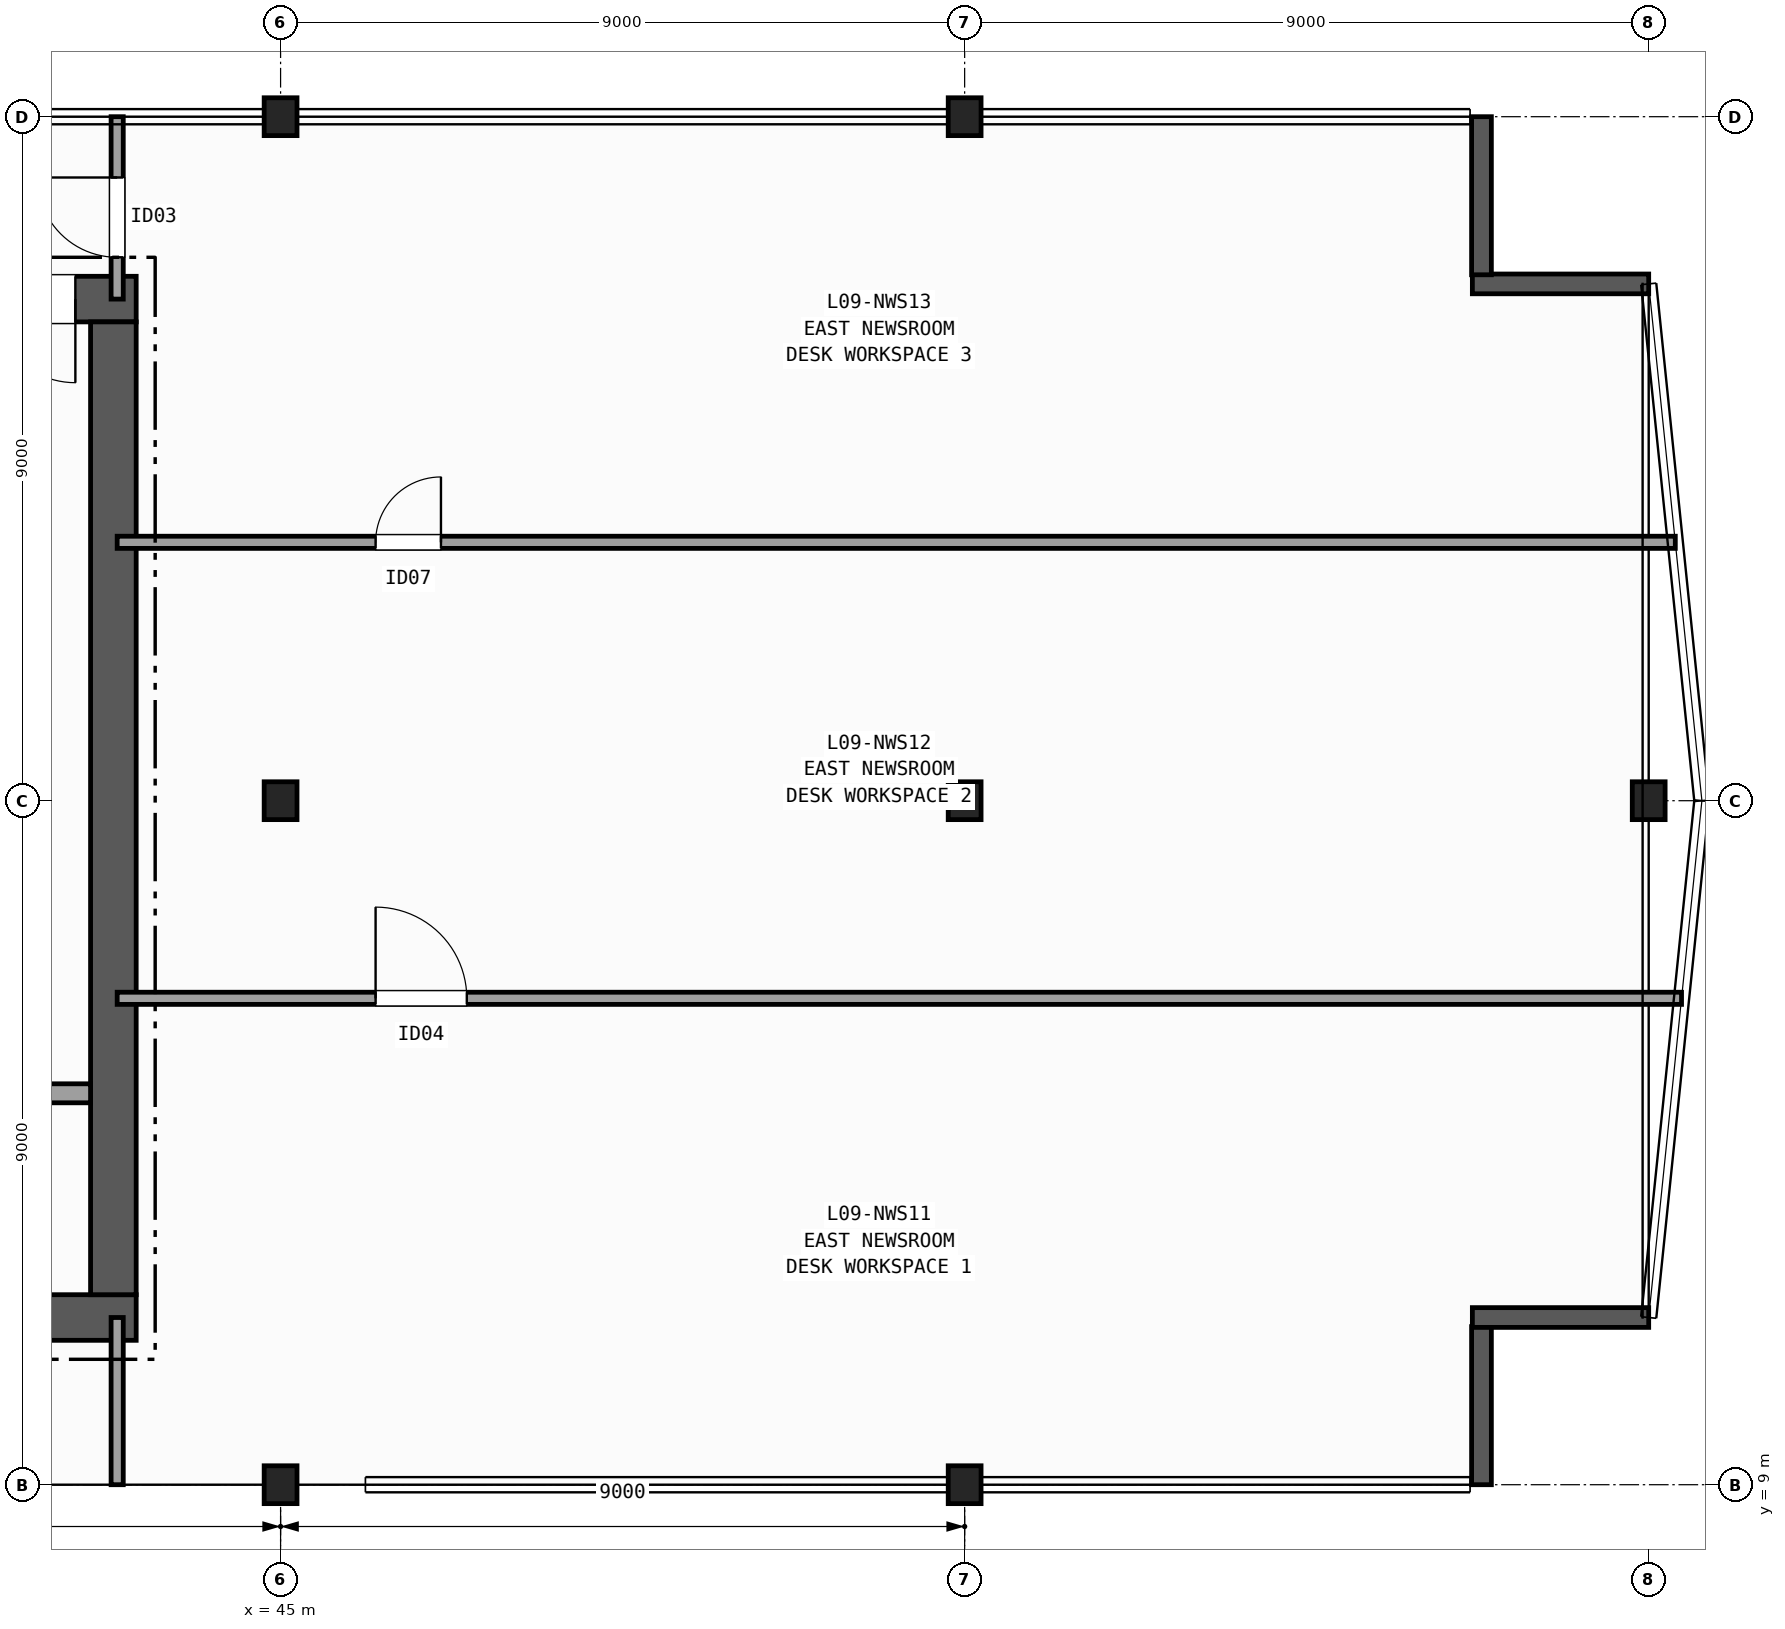
"""IFC4 building model, lengths in metres.
Left out: names, types, materials, properties, quantities, classifications, styles, units other than length and angle.
Written with IfcOpenShell. Run it as: python <this file> out.ifc"""

import sys

from ifc_helpers import new_model, si_unit, direction, frame, frame_2d, origin, origin_2d, place, context, subcontext, project, spatial, rectangle, i_section, extrude, element, fill, save


model = new_model("IFC4")
c1 = context("Model", 3, precision=1e-05, world=origin(), true_north=direction((0.0, 1.0)))
c2 = subcontext(c1, "Body", "Model", "MODEL_VIEW")
j1 = project(units=[si_unit("LENGTHUNIT", "METRE"), si_unit("PLANEANGLEUNIT", "RADIAN")], contexts=[c1])
p1 = place(None, origin())
s1 = spatial("IfcSite", under=j1, at=p1, CompositionType="ELEMENT")
p2 = place(p1, origin())
s2 = spatial("IfcBuilding", under=s1, at=p2, CompositionType="ELEMENT")
p3 = place(p2, frame((0.0, 0.0, 43.4)))
s3 = spatial("IfcBuildingStorey", under=s2, at=p3, CompositionType="ELEMENT", Elevation=43.4)
for number, where, z_axis, x_axis in (
    (1, (45.0, 9.0, 0.0), (0.0, 0.0, 1.0), (1.0, 0.0, 0.0)),
    (2, (45.0, 18.0, 0.0), (0.0, 0.0, 1.0), (1.0, 0.0, 0.0)),
    (3, (45.0, 27.0, 0.0), (0.0, 0.0, 1.0), (1.0, 0.0, 0.0)),
    (4, (54.0, 9.0, 0.0), (0.0, 0.0, 1.0), (1.0, 0.0, 0.0)),
    (5, (54.0, 18.0, 0.0), (0.0, 0.0, 1.0), (1.0, 0.0, 0.0)),
    (6, (54.0, 27.0, 0.0), (0.0, 0.0, 1.0), (1.0, 0.0, 0.0)),
    (7, (63.0, 18.0, 0.0), (0.0, 0.0, 1.0), (1.0, 0.0, 0.0)),
):
    element("IfcColumn", number, at=place(p3, frame(where, z_axis=z_axis, x_axis=x_axis)), inside=s3, PredefinedType="COLUMN", context=c2, shape_type="SweptSolid", body=[
        extrude(i_section(OverallWidth=0.432, OverallDepth=0.498, WebThickness=0.056, FlangeThickness=0.089, FilletRadius=0.015, at=origin_2d()), origin(), (0.0, 0.0, 1.0), 3.7),
    ])
p4 = place(p3, frame((60.8, 9.0, 0.0), z_axis=(0.0, 0.0, 1.0), x_axis=(0.0, 1.0, 0.0)))
e8 = element("IfcWall", 8, at=p4, inside=s3, PredefinedType="SOLIDWALL", context=c2, shape_type="SweptSolid", body=[
    extrude(rectangle(XDim=2.08, YDim=0.26, at=frame_2d((1.04, 0.0))), origin(), (0.0, 0.0, 1.0), 3.42),
])
for number, where, z_axis, x_axis in (
    (9, (60.68, 11.2, 0.0), (0.0, 0.0, 1.0), (1.0, 0.0, 0.0)),
    (10, (63.0, 24.8, 0.0), (0.0, 0.0, 1.0), (-1.0, 0.0, 0.0)),
):
    element("IfcWall", number, at=place(p3, frame(where, z_axis=z_axis, x_axis=x_axis)), inside=s3, PredefinedType="SOLIDWALL", context=c2, shape_type="SweptSolid", body=[
        extrude(rectangle(XDim=2.32, YDim=0.26, at=frame_2d((1.16, 0.0))), origin(), (0.0, 0.0, 1.0), 3.42),
    ])
p5 = place(p3, frame((60.8, 24.92, 0.0), z_axis=(0.0, 0.0, 1.0), x_axis=(0.0, 1.0, 0.0)))
e11 = element("IfcWall", 11, at=p5, inside=s3, PredefinedType="SOLIDWALL", context=c2, shape_type="SweptSolid", body=[
    extrude(rectangle(XDim=2.08, YDim=0.26, at=frame_2d((1.04, 0.0))), origin(), (0.0, 0.0, 1.0), 3.42),
])
p6 = place(p3, frame((29.1, 11.2, 0.0), z_axis=(0.0, 0.0, 1.0), x_axis=(1.0, 0.0, 0.0)))
e12 = element("IfcWall", 12, at=p6, inside=s3, PredefinedType="SHEAR", context=c2, shape_type="SweptSolid", body=[
    extrude(rectangle(XDim=14.0, YDim=0.6, at=frame_2d((7.0, 0.0))), origin(), (0.0, 0.0, 1.0), 3.42),
])
p7 = place(p3, frame((43.1, 24.6, 0.0), z_axis=(0.0, 0.0, 1.0), x_axis=(-1.0, 0.0, 0.0)))
e13 = element("IfcWall", 13, at=p7, inside=s3, PredefinedType="SHEAR", context=c2, shape_type="SweptSolid", body=[
    extrude(rectangle(XDim=14.0, YDim=0.6, at=frame_2d((7.0, 0.0))), origin(), (0.0, 0.0, 1.0), 3.42),
])
p8 = place(p7, frame((0.8, 0.0, 0.0)))
e14 = element("IfcOpeningElement", 14, at=p8, cuts=e13, PredefinedType="OPENING", context=c2, shape_type="SweptSolid", body=[
    extrude(rectangle(XDim=1.1, YDim=2.15, at=frame_2d((0.55, 1.075))), frame((0.0, 0.31, 0.0), z_axis=(0.0, -1.0, 0.0), x_axis=(1.0, 0.0, 0.0)), (0.0, 0.0, 1.0), 0.62),
])
p9 = place(p7, frame((2.3, 0.0, 0.0)))
e15 = element("IfcOpeningElement", 15, at=p9, cuts=e13, PredefinedType="OPENING", context=c2, shape_type="SweptSolid", body=[
    extrude(rectangle(XDim=0.9, YDim=2.1, at=frame_2d((0.45, 1.05))), frame((0.0, 0.31, 0.0), z_axis=(0.0, -1.0, 0.0), x_axis=(1.0, 0.0, 0.0)), (0.0, 0.0, 1.0), 0.62),
])
p10 = place(p7, frame((3.6, 0.0, 0.0)))
e16 = element("IfcOpeningElement", 16, at=p10, cuts=e13, PredefinedType="OPENING", context=c2, shape_type="SweptSolid", body=[
    extrude(rectangle(XDim=0.9, YDim=2.1, at=frame_2d((0.45, 1.05))), frame((0.0, 0.31, 0.0), z_axis=(0.0, -1.0, 0.0), x_axis=(1.0, 0.0, 0.0)), (0.0, 0.0, 1.0), 0.62),
])
p11 = place(p7, frame((4.95, 0.0, 0.0)))
e17 = element("IfcOpeningElement", 17, at=p11, cuts=e13, PredefinedType="OPENING", context=c2, shape_type="SweptSolid", body=[
    extrude(rectangle(XDim=0.9, YDim=2.1, at=frame_2d((0.45, 1.05))), frame((0.0, 0.31, 0.0), z_axis=(0.0, -1.0, 0.0), x_axis=(1.0, 0.0, 0.0)), (0.0, 0.0, 1.0), 0.62),
])
p12 = place(p3, frame((42.8, 11.5, 0.0), z_axis=(0.0, 0.0, 1.0), x_axis=(0.0, 1.0, 0.0)))
e18 = element("IfcWall", 18, at=p12, inside=s3, PredefinedType="SHEAR", context=c2, shape_type="SweptSolid", body=[
    extrude(rectangle(XDim=12.8, YDim=0.6, at=frame_2d((6.4, 0.0))), origin(), (0.0, 0.0, 1.0), 3.42),
])
p13 = place(p3, frame((33.07, 14.15, 0.0), z_axis=(0.0, 0.0, 1.0), x_axis=(1.0, 0.0, 0.0)))
e19 = element("IfcWall", 19, at=p13, inside=s3, PredefinedType="PARTITIONING", context=c2, shape_type="SweptSolid", body=[
    extrude(rectangle(XDim=9.43, YDim=0.25, at=frame_2d((4.715, 0.0))), origin(), (0.0, 0.0, 1.0), 3.42),
])
p14 = place(p13, frame((0.755, 0.0, 0.0)))
e20 = element("IfcOpeningElement", 20, at=p14, cuts=e19, PredefinedType="OPENING", context=c2, shape_type="SweptSolid", body=[
    extrude(rectangle(XDim=1.15, YDim=2.15, at=frame_2d((0.575, 1.075))), frame((0.0, 0.135, 0.0), z_axis=(0.0, -1.0, 0.0), x_axis=(1.0, 0.0, 0.0)), (0.0, 0.0, 1.0), 0.27),
])
p15 = place(p13, frame((3.355, 0.0, 0.0)))
e21 = element("IfcOpeningElement", 21, at=p15, cuts=e19, PredefinedType="OPENING", context=c2, shape_type="SweptSolid", body=[
    extrude(rectangle(XDim=1.15, YDim=2.15, at=frame_2d((0.575, 1.075))), frame((0.0, 0.135, 0.0), z_axis=(0.0, -1.0, 0.0), x_axis=(1.0, 0.0, 0.0)), (0.0, 0.0, 1.0), 0.27),
])
p16 = place(p3, frame((42.85, 9.0, 0.0), z_axis=(0.0, 0.0, 1.0), x_axis=(0.0, 1.0, 0.0)))
e22 = element("IfcWall", 22, at=p16, inside=s3, PredefinedType="PARTITIONING", context=c2, shape_type="SweptSolid", body=[
    extrude(rectangle(XDim=2.2, YDim=0.16, at=frame_2d((1.1, 0.0))), origin(), (0.0, 0.0, 1.0), 2.627),
])
p17 = place(p3, frame((42.85, 24.6, 0.0), z_axis=(0.0, 0.0, 1.0), x_axis=(0.0, 1.0, 0.0)))
e23 = element("IfcWall", 23, at=p17, inside=s3, PredefinedType="PARTITIONING", context=c2, shape_type="SweptSolid", body=[
    extrude(rectangle(XDim=2.4, YDim=0.16, at=frame_2d((1.2, 0.0))), origin(), (0.0, 0.0, 1.0), 2.627),
])
p18 = place(p17, frame((0.55, 0.0, 0.0)))
e24 = element("IfcOpeningElement", 24, at=p18, cuts=e23, PredefinedType="OPENING", context=c2, shape_type="SweptSolid", body=[
    extrude(rectangle(XDim=1.05, YDim=2.15, at=frame_2d((0.525, 1.075))), frame((0.0, 0.09, 0.0), z_axis=(0.0, -1.0, 0.0), x_axis=(1.0, 0.0, 0.0)), (0.0, 0.0, 1.0), 0.18),
])
p19 = place(p3, frame((42.85, 15.4, 0.0), z_axis=(0.0, 0.0, 1.0), x_axis=(1.0, 0.0, 0.0)))
e25 = element("IfcWall", 25, at=p19, inside=s3, PredefinedType="PARTITIONING", context=c2, shape_type="SweptSolid", body=[
    extrude(rectangle(XDim=20.582, YDim=0.16, at=frame_2d((10.291, 0.0))), origin(), (0.0, 0.0, 1.0), 3.42),
])
p20 = place(p19, frame((3.4, 0.0, 0.0)))
e26 = element("IfcOpeningElement", 26, at=p20, cuts=e25, PredefinedType="OPENING", context=c2, shape_type="SweptSolid", body=[
    extrude(rectangle(XDim=1.2, YDim=2.15, at=frame_2d((0.6, 1.075))), frame((0.0, 0.09, 0.0), z_axis=(0.0, -1.0, 0.0), x_axis=(1.0, 0.0, 0.0)), (0.0, 0.0, 1.0), 0.18),
])
p21 = place(p3, frame((42.85, 21.4, 0.0), z_axis=(0.0, 0.0, 1.0), x_axis=(1.0, 0.0, 0.0)))
e27 = element("IfcWall", 27, at=p21, inside=s3, PredefinedType="PARTITIONING", context=c2, shape_type="SweptSolid", body=[
    extrude(rectangle(XDim=20.5, YDim=0.16, at=frame_2d((10.25, 0.0))), origin(), (0.0, 0.0, 1.0), 3.42),
])
p22 = place(p21, frame((3.4, 0.0, 0.0)))
e28 = element("IfcOpeningElement", 28, at=p22, cuts=e27, PredefinedType="OPENING", context=c2, shape_type="SweptSolid", body=[
    extrude(rectangle(XDim=0.86, YDim=2.05, at=frame_2d((0.43, 1.025))), frame((0.0, 0.09, 0.0), z_axis=(0.0, -1.0, 0.0), x_axis=(1.0, 0.0, 0.0)), (0.0, 0.0, 1.0), 0.18),
])
p23 = place(p8, origin())
e29 = element("IfcDoor", 29, at=p23, inside=s3, OperationType="SINGLE_SWING_LEFT", PredefinedType="DOOR", context=c2, shape_type="SweptSolid", body=[
    extrude(rectangle(XDim=1.1, YDim=2.15, at=frame_2d((0.55, 1.075))), frame((0.0, 0.025, 0.0), z_axis=(0.0, -1.0, 0.0), x_axis=(1.0, 0.0, 0.0)), (0.0, 0.0, 1.0), 0.05),
])
fill(e14, e29)
p24 = place(p18, origin())
e30 = element("IfcDoor", 30, at=p24, inside=s3, OperationType="SINGLE_SWING_RIGHT", PredefinedType="DOOR", context=c2, shape_type="SweptSolid", body=[
    extrude(rectangle(XDim=1.05, YDim=2.15, at=frame_2d((0.525, 1.075))), frame((0.0, 0.025, 0.0), z_axis=(0.0, -1.0, 0.0), x_axis=(1.0, 0.0, 0.0)), (0.0, 0.0, 1.0), 0.05),
])
fill(e24, e30)
p25 = place(p20, origin())
e31 = element("IfcDoor", 31, at=p25, inside=s3, OperationType="SINGLE_SWING_LEFT", PredefinedType="DOOR", context=c2, shape_type="SweptSolid", body=[
    extrude(rectangle(XDim=1.2, YDim=2.15, at=frame_2d((0.6, 1.075))), frame((0.0, 0.025, 0.0), z_axis=(0.0, -1.0, 0.0), x_axis=(1.0, 0.0, 0.0)), (0.0, 0.0, 1.0), 0.05),
])
fill(e26, e31)
p26 = place(p22, origin())
e32 = element("IfcDoor", 32, at=p26, inside=s3, OperationType="SINGLE_SWING_RIGHT", PredefinedType="DOOR", context=c2, shape_type="SweptSolid", body=[
    extrude(rectangle(XDim=0.86, YDim=2.05, at=frame_2d((0.43, 1.025))), frame((0.0, 0.025, 0.0), z_axis=(0.0, -1.0, 0.0), x_axis=(1.0, 0.0, 0.0)), (0.0, 0.0, 1.0), 0.05),
])
fill(e28, e32)
save(model, sys.argv[1])
